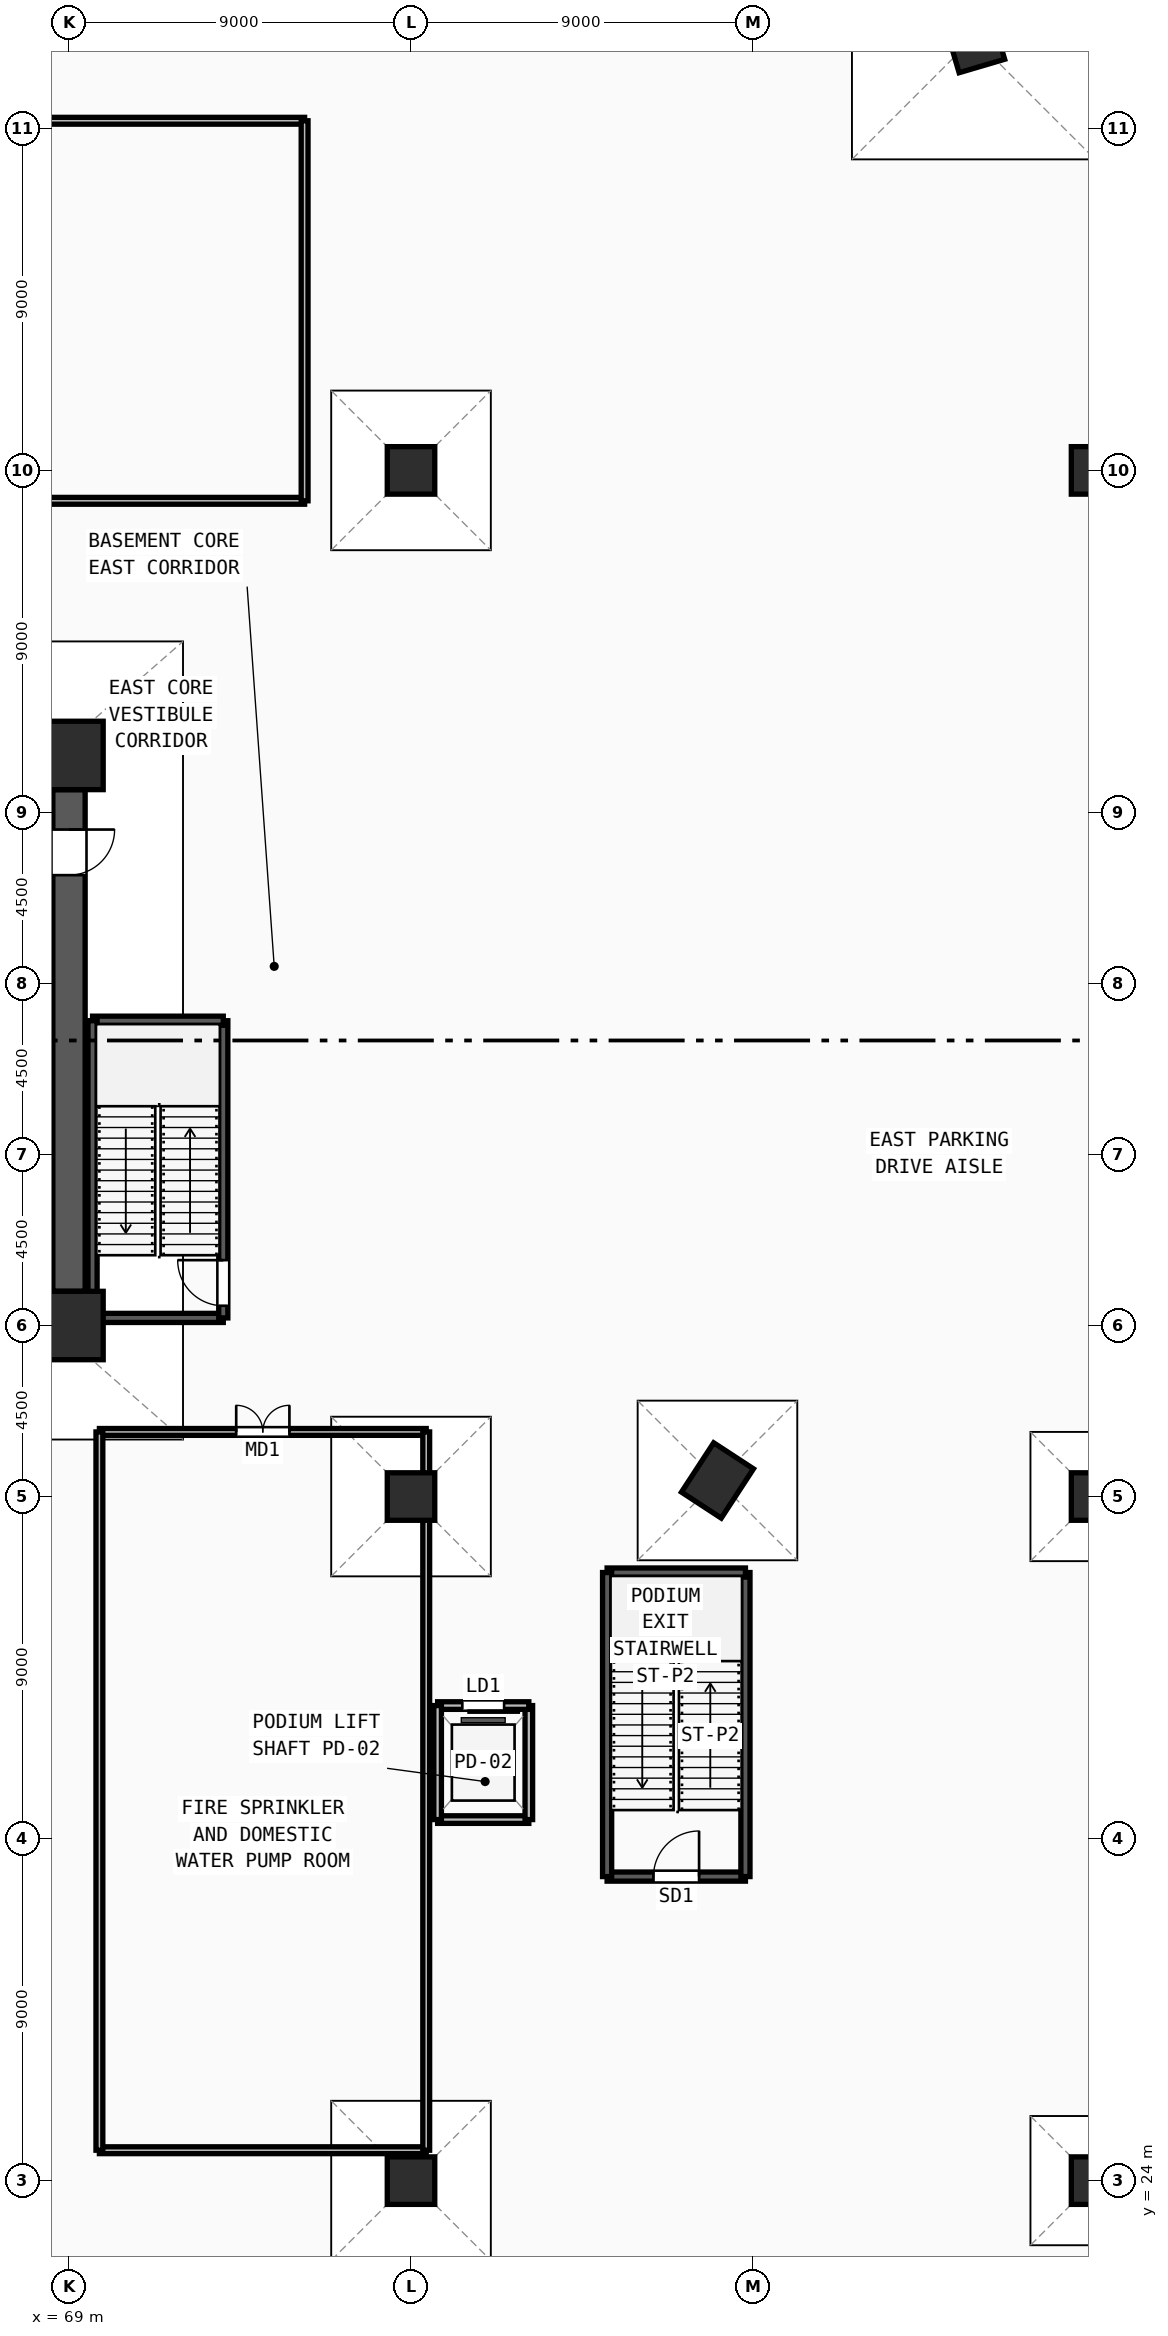
"""IFC4 building model, lengths in metres.
Left out: names, types, materials, properties, quantities, classifications, styles, units other than length and angle.
Written with IfcOpenShell. Run it as: python <this file> out.ifc"""

import sys

from ifc_helpers import new_model, si_unit, direction, frame, frame_2d, origin, origin_2d, place, context, subcontext, project, spatial, rectangle, extrude, source, transform, mapped, element, fill, save


model = new_model("IFC4")
c1 = context("Model", 3, precision=1e-05, world=origin(), true_north=direction((0.0, 1.0)))
c2 = subcontext(c1, "Body", "Model", "MODEL_VIEW")
j1 = project(units=[si_unit("LENGTHUNIT", "METRE"), si_unit("PLANEANGLEUNIT", "RADIAN")], contexts=[c1])
p1 = place(None, origin())
s1 = spatial("IfcSite", under=j1, at=p1, CompositionType="ELEMENT")
p2 = place(p1, origin())
s2 = spatial("IfcBuilding", under=s1, at=p2, CompositionType="ELEMENT")
p3 = place(p2, frame((0.0, 0.0, -9.6)))
s3 = spatial("IfcBuildingStorey", under=s2, at=p3, CompositionType="ELEMENT", Elevation=-9.6)
m1 = source(origin(), c2, "Body", "SweptSolid", [
    extrude(rectangle(XDim=1.8, YDim=1.8, at=origin_2d()), origin(), (0.0, 0.0, 1.0), 4.8),
])
for number, where, z_axis, x_axis in (
    (1, (69.0, 46.5, 0.0), (0.0, 0.0, 1.0), (1.0, 0.0, 0.0)),
    (2, (69.0, 61.5, 0.0), (0.0, 0.0, 1.0), (1.0, 0.0, 0.0)),
):
    element("IfcColumn", number, at=place(p3, frame(where, z_axis=z_axis, x_axis=x_axis)), inside=s3, PredefinedType="COLUMN", context=c2, shape_type="MappedRepresentation", body=[
        mapped(m1, transform((0.0, 0.0, 0.0), x_axis=(1.0, 0.0, 0.0), y_axis=(0.0, 1.0, 0.0), z_axis=(0.0, 0.0, 1.0), scale=1.0)),
    ])
m2 = source(origin(), c2, "Body", "SweptSolid", [
    extrude(rectangle(XDim=1.55, YDim=1.25, at=origin_2d()), origin(), (0.0, 0.0, 1.0), 4.8),
])
for number, where, z_axis, x_axis in (
    (3, (92.803, 80.384, 0.0), (0.0, 0.0, 1.0), (-0.283, 0.959, 0.0)),
    (4, (86.064, 42.423, 0.0), (0.0, 0.0, 1.0), (0.547, 0.837, 0.0)),
):
    element("IfcColumn", number, at=place(p3, frame(where, z_axis=z_axis, x_axis=x_axis)), inside=s3, PredefinedType="COLUMN", context=c2, shape_type="MappedRepresentation", body=[
        mapped(m2, transform((0.0, 0.0, 0.0), x_axis=(1.0, 0.0, 0.0), y_axis=(0.0, 1.0, 0.0), z_axis=(0.0, 0.0, 1.0), scale=1.0)),
    ])
m3 = source(origin(), c2, "Body", "SweptSolid", [
    extrude(rectangle(XDim=1.25, YDim=1.25, at=origin_2d()), origin(), (0.0, 0.0, 1.0), 4.8),
])
for number, where, z_axis, x_axis in (
    (5, (78.0, 24.0, 0.0), (0.0, 0.0, 1.0), (1.0, 0.0, 0.0)),
    (6, (96.0, 24.0, 0.0), (0.0, 0.0, 1.0), (1.0, 0.0, 0.0)),
    (7, (78.0, 42.0, 0.0), (0.0, 0.0, 1.0), (1.0, 0.0, 0.0)),
    (8, (96.0, 42.0, 0.0), (0.0, 0.0, 1.0), (1.0, 0.0, 0.0)),
    (9, (78.0, 69.0, 0.0), (0.0, 0.0, 1.0), (1.0, 0.0, 0.0)),
    (10, (96.0, 69.0, 0.0), (0.0, 0.0, 1.0), (1.0, 0.0, 0.0)),
):
    element("IfcColumn", number, at=place(p3, frame(where, z_axis=z_axis, x_axis=x_axis)), inside=s3, PredefinedType="COLUMN", context=c2, shape_type="MappedRepresentation", body=[
        mapped(m3, transform((0.0, 0.0, 0.0), x_axis=(1.0, 0.0, 0.0), y_axis=(0.0, 1.0, 0.0), z_axis=(0.0, 0.0, 1.0), scale=1.0)),
    ])
p4 = place(p3, frame((69.0, 60.6, 0.0), z_axis=(0.0, 0.0, 1.0), x_axis=(0.0, -1.0, 0.0)))
e11 = element("IfcWall", 11, at=p4, inside=s3, PredefinedType="SHEAR", context=c2, shape_type="SweptSolid", body=[
    extrude(rectangle(XDim=13.2, YDim=0.85, at=frame_2d((6.6, 0.0))), origin(), (0.0, 0.0, 1.0), 4.5),
])
m4 = source(origin(), c2, "Body", "SweptSolid", [
    extrude(rectangle(XDim=1.2, YDim=2.2, at=frame_2d((0.6, 1.1))), frame((0.0, 0.435, 0.0), z_axis=(0.0, -1.0, 0.0), x_axis=(1.0, 0.0, 0.0)), (0.0, 0.0, 1.0), 0.87),
])
p5 = place(p4, frame((1.05, 0.0, 0.0)))
e12 = element("IfcOpeningElement", 12, at=p5, cuts=e11, PredefinedType="OPENING", context=c2, shape_type="MappedRepresentation", body=[
    mapped(m4, transform((0.0, 0.0, 0.0), x_axis=(1.0, 0.0, 0.0), y_axis=(0.0, 1.0, 0.0), z_axis=(0.0, 0.0, 1.0), scale=1.0)),
])
p6 = place(p3, frame((69.62, 46.7, 0.0), z_axis=(0.0, 0.0, 1.0), x_axis=(1.0, 0.0, 0.0)))
e13 = element("IfcWall", 13, at=p6, inside=s3, PredefinedType="SOLIDWALL", context=c2, shape_type="SweptSolid", body=[
    extrude(rectangle(XDim=3.44, YDim=0.24, at=frame_2d((1.72, 0.0))), origin(), (0.0, 0.0, 1.0), 4.5),
])
p7 = place(p3, frame((73.06, 46.7, 0.0), z_axis=(0.0, 0.0, 1.0), x_axis=(0.0, 1.0, 0.0)))
e14 = element("IfcWall", 14, at=p7, inside=s3, PredefinedType="SOLIDWALL", context=c2, shape_type="SweptSolid", body=[
    extrude(rectangle(XDim=7.82, YDim=0.24, at=frame_2d((3.91, 0.0))), origin(), (0.0, 0.0, 1.0), 4.5),
])
m5 = source(origin(), c2, "Body", "SweptSolid", [
    extrude(rectangle(XDim=1.2, YDim=2.2, at=frame_2d((0.6, 1.1))), frame((0.0, 0.13, 0.0), z_axis=(0.0, -1.0, 0.0), x_axis=(1.0, 0.0, 0.0)), (0.0, 0.0, 1.0), 0.26),
])
p8 = place(p7, frame((0.32, 0.0, 0.0)))
e15 = element("IfcOpeningElement", 15, at=p8, cuts=e14, PredefinedType="OPENING", context=c2, shape_type="MappedRepresentation", body=[
    mapped(m5, transform((0.0, 0.0, 0.0), x_axis=(1.0, 0.0, 0.0), y_axis=(0.0, 1.0, 0.0), z_axis=(0.0, 0.0, 1.0), scale=1.0)),
])
p9 = place(p3, frame((73.06, 54.52, 0.0), z_axis=(0.0, 0.0, 1.0), x_axis=(-1.0, 0.0, 0.0)))
e16 = element("IfcWall", 16, at=p9, inside=s3, PredefinedType="SOLIDWALL", context=c2, shape_type="SweptSolid", body=[
    extrude(rectangle(XDim=3.44, YDim=0.24, at=frame_2d((1.72, 0.0))), origin(), (0.0, 0.0, 1.0), 4.5),
])
p10 = place(p3, frame((69.62, 54.52, 0.0), z_axis=(0.0, 0.0, 1.0), x_axis=(0.0, -1.0, 0.0)))
e17 = element("IfcWall", 17, at=p10, inside=s3, PredefinedType="SOLIDWALL", context=c2, shape_type="SweptSolid", body=[
    extrude(rectangle(XDim=7.82, YDim=0.24, at=frame_2d((3.91, 0.0))), origin(), (0.0, 0.0, 1.0), 4.5),
])
p11 = place(p3, frame((83.16, 32.0, 0.0), z_axis=(0.0, 0.0, 1.0), x_axis=(1.0, 0.0, 0.0)))
e18 = element("IfcWall", 18, at=p11, inside=s3, PredefinedType="SOLIDWALL", context=c2, shape_type="SweptSolid", body=[
    extrude(rectangle(XDim=3.64, YDim=0.24, at=frame_2d((1.82, 0.0))), origin(), (0.0, 0.0, 1.0), 4.5),
])
p12 = place(p11, frame((1.22, 0.0, 0.0)))
e19 = element("IfcOpeningElement", 19, at=p12, cuts=e18, PredefinedType="OPENING", context=c2, shape_type="MappedRepresentation", body=[
    mapped(m5, transform((0.0, 0.0, 0.0), x_axis=(1.0, 0.0, 0.0), y_axis=(0.0, 1.0, 0.0), z_axis=(0.0, 0.0, 1.0), scale=1.0)),
])
p13 = place(p3, frame((86.8, 32.0, 0.0), z_axis=(0.0, 0.0, 1.0), x_axis=(0.0, 1.0, 0.0)))
e20 = element("IfcWall", 20, at=p13, inside=s3, PredefinedType="SOLIDWALL", context=c2, shape_type="SweptSolid", body=[
    extrude(rectangle(XDim=8.0, YDim=0.24, at=frame_2d((4.0, 0.0))), origin(), (0.0, 0.0, 1.0), 4.5),
])
p14 = place(p3, frame((86.8, 40.0, 0.0), z_axis=(0.0, 0.0, 1.0), x_axis=(-1.0, 0.0, 0.0)))
e21 = element("IfcWall", 21, at=p14, inside=s3, PredefinedType="SOLIDWALL", context=c2, shape_type="SweptSolid", body=[
    extrude(rectangle(XDim=3.64, YDim=0.24, at=frame_2d((1.82, 0.0))), origin(), (0.0, 0.0, 1.0), 4.5),
])
p15 = place(p3, frame((83.16, 40.0, 0.0), z_axis=(0.0, 0.0, 1.0), x_axis=(0.0, -1.0, 0.0)))
e22 = element("IfcWall", 22, at=p15, inside=s3, PredefinedType="SOLIDWALL", context=c2, shape_type="SweptSolid", body=[
    extrude(rectangle(XDim=8.0, YDim=0.24, at=frame_2d((4.0, 0.0))), origin(), (0.0, 0.0, 1.0), 4.5),
])
p16 = place(p3, frame((78.7, 33.5, 0.0), z_axis=(0.0, 0.0, 1.0), x_axis=(1.0, 0.0, 0.0)))
e23 = element("IfcWall", 23, at=p16, inside=s3, PredefinedType="SOLIDWALL", context=c2, shape_type="SweptSolid", body=[
    extrude(rectangle(XDim=2.4, YDim=0.2, at=frame_2d((1.2, 0.0))), origin(), (0.0, 0.0, 1.0), 4.5),
])
p17 = place(p3, frame((81.1, 33.5, 0.0), z_axis=(0.0, 0.0, 1.0), x_axis=(0.0, 1.0, 0.0)))
e24 = element("IfcWall", 24, at=p17, inside=s3, PredefinedType="SOLIDWALL", context=c2, shape_type="SweptSolid", body=[
    extrude(rectangle(XDim=3.0, YDim=0.2, at=frame_2d((1.5, 0.0))), origin(), (0.0, 0.0, 1.0), 4.5),
])
p18 = place(p3, frame((81.1, 36.5, 0.0), z_axis=(0.0, 0.0, 1.0), x_axis=(-1.0, 0.0, 0.0)))
e25 = element("IfcWall", 25, at=p18, inside=s3, PredefinedType="SOLIDWALL", context=c2, shape_type="SweptSolid", body=[
    extrude(rectangle(XDim=2.4, YDim=0.2, at=frame_2d((1.2, 0.0))), origin(), (0.0, 0.0, 1.0), 4.5),
])
m6 = source(origin(), c2, "Body", "SweptSolid", [
    extrude(rectangle(XDim=1.1, YDim=2.2, at=frame_2d((0.55, 1.1))), frame((0.0, 0.11, 0.0), z_axis=(0.0, -1.0, 0.0), x_axis=(1.0, 0.0, 0.0)), (0.0, 0.0, 1.0), 0.22),
])
p19 = place(p18, frame((0.65, 0.0, 0.0)))
e26 = element("IfcOpeningElement", 26, at=p19, cuts=e25, PredefinedType="OPENING", context=c2, shape_type="MappedRepresentation", body=[
    mapped(m6, transform((0.0, 0.0, 0.0), x_axis=(1.0, 0.0, 0.0), y_axis=(0.0, 1.0, 0.0), z_axis=(0.0, 0.0, 1.0), scale=1.0)),
])
p20 = place(p3, frame((78.7, 36.5, 0.0), z_axis=(0.0, 0.0, 1.0), x_axis=(0.0, -1.0, 0.0)))
e27 = element("IfcWall", 27, at=p20, inside=s3, PredefinedType="SOLIDWALL", context=c2, shape_type="SweptSolid", body=[
    extrude(rectangle(XDim=3.0, YDim=0.2, at=frame_2d((1.5, 0.0))), origin(), (0.0, 0.0, 1.0), 4.5),
])
p21 = place(p3, frame((69.8, 43.7, 0.0), z_axis=(0.0, 0.0, 1.0), x_axis=(1.0, 0.0, 0.0)))
e28 = element("IfcWall", 28, at=p21, inside=s3, PredefinedType="PARTITIONING", context=c2, shape_type="SweptSolid", body=[
    extrude(rectangle(XDim=8.6, YDim=0.18, at=frame_2d((4.3, 0.0))), origin(), (0.0, 0.0, 1.0), 4.5),
])
m7 = source(origin(), c2, "Body", "SweptSolid", [
    extrude(rectangle(XDim=1.4, YDim=2.25, at=frame_2d((0.7, 1.125))), frame((0.0, 0.1, 0.0), z_axis=(0.0, -1.0, 0.0), x_axis=(1.0, 0.0, 0.0)), (0.0, 0.0, 1.0), 0.2),
])
p22 = place(p21, frame((3.6, 0.0, 0.0)))
e29 = element("IfcOpeningElement", 29, at=p22, cuts=e28, PredefinedType="OPENING", context=c2, shape_type="MappedRepresentation", body=[
    mapped(m7, transform((0.0, 0.0, 0.0), x_axis=(1.0, 0.0, 0.0), y_axis=(0.0, 1.0, 0.0), z_axis=(0.0, 0.0, 1.0), scale=1.0)),
])
p23 = place(p3, frame((60.2, 68.2, 0.0), z_axis=(0.0, 0.0, 1.0), x_axis=(1.0, 0.0, 0.0)))
e30 = element("IfcWall", 30, at=p23, inside=s3, PredefinedType="PARTITIONING", context=c2, shape_type="SweptSolid", body=[
    extrude(rectangle(XDim=15.0, YDim=0.18, at=frame_2d((7.5, 0.0))), origin(), (0.0, 0.0, 1.0), 4.5),
])
p24 = place(p23, frame((6.8, 0.0, 0.0)))
e31 = element("IfcOpeningElement", 31, at=p24, cuts=e30, PredefinedType="OPENING", context=c2, shape_type="MappedRepresentation", body=[
    mapped(m7, transform((0.0, 0.0, 0.0), x_axis=(1.0, 0.0, 0.0), y_axis=(0.0, 1.0, 0.0), z_axis=(0.0, 0.0, 1.0), scale=1.0)),
])
p25 = place(p3, frame((69.8, 24.8, 0.0), z_axis=(0.0, 0.0, 1.0), x_axis=(1.0, 0.0, 0.0)))
e32 = element("IfcWall", 32, at=p25, inside=s3, PredefinedType="PARTITIONING", context=c2, shape_type="SweptSolid", body=[
    extrude(rectangle(XDim=8.6, YDim=0.18, at=frame_2d((4.3, 0.0))), origin(), (0.0, 0.0, 1.0), 4.5),
])
for number, where, z_axis, x_axis in (
    (33, (69.8, 24.8, 0.0), (0.0, 0.0, 1.0), (0.0, 1.0, 0.0)),
    (34, (78.4, 24.8, 0.0), (0.0, 0.0, 1.0), (0.0, 1.0, 0.0)),
):
    element("IfcWall", number, at=place(p3, frame(where, z_axis=z_axis, x_axis=x_axis)), inside=s3, PredefinedType="PARTITIONING", context=c2, shape_type="SweptSolid", body=[
        extrude(rectangle(XDim=18.9, YDim=0.18, at=frame_2d((9.45, 0.0))), origin(), (0.0, 0.0, 1.0), 4.5),
    ])
p26 = place(p3, frame((60.2, 78.2, 0.0), z_axis=(0.0, 0.0, 1.0), x_axis=(1.0, 0.0, 0.0)))
e35 = element("IfcWall", 35, at=p26, inside=s3, PredefinedType="PARTITIONING", context=c2, shape_type="SweptSolid", body=[
    extrude(rectangle(XDim=15.0, YDim=0.18, at=frame_2d((7.5, 0.0))), origin(), (0.0, 0.0, 1.0), 4.5),
])
p27 = place(p3, frame((75.2, 68.2, 0.0), z_axis=(0.0, 0.0, 1.0), x_axis=(0.0, 1.0, 0.0)))
e36 = element("IfcWall", 36, at=p27, inside=s3, PredefinedType="PARTITIONING", context=c2, shape_type="SweptSolid", body=[
    extrude(rectangle(XDim=10.0, YDim=0.18, at=frame_2d((5.0, 0.0))), origin(), (0.0, 0.0, 1.0), 4.5),
])
m8 = source(origin(), c2, "Body", "SweptSolid", [
    extrude(rectangle(XDim=1.2, YDim=2.2, at=frame_2d((0.6, 1.1))), frame((0.0, 0.025, 0.0), z_axis=(0.0, -1.0, 0.0), x_axis=(1.0, 0.0, 0.0)), (0.0, 0.0, 1.0), 0.05),
])
p28 = place(p5, origin())
e37 = element("IfcDoor", 37, at=p28, inside=s3, OperationType="SINGLE_SWING_LEFT", PredefinedType="DOOR", context=c2, shape_type="MappedRepresentation", body=[
    mapped(m8, transform((0.0, 0.0, 0.0), x_axis=(1.0, 0.0, 0.0), y_axis=(0.0, 1.0, 0.0), z_axis=(0.0, 0.0, 1.0), scale=1.0)),
])
fill(e12, e37)
p29 = place(p8, origin())
e38 = element("IfcDoor", 38, at=p29, inside=s3, OperationType="SINGLE_SWING_RIGHT", PredefinedType="DOOR", context=c2, shape_type="MappedRepresentation", body=[
    mapped(m8, transform((0.0, 0.0, 0.0), x_axis=(1.0, 0.0, 0.0), y_axis=(0.0, 1.0, 0.0), z_axis=(0.0, 0.0, 1.0), scale=1.0)),
])
fill(e15, e38)
p30 = place(p12, origin())
e39 = element("IfcDoor", 39, at=p30, inside=s3, OperationType="SINGLE_SWING_RIGHT", PredefinedType="DOOR", context=c2, shape_type="MappedRepresentation", body=[
    mapped(m8, transform((0.0, 0.0, 0.0), x_axis=(1.0, 0.0, 0.0), y_axis=(0.0, 1.0, 0.0), z_axis=(0.0, 0.0, 1.0), scale=1.0)),
])
fill(e19, e39)
m9 = source(origin(), c2, "Body", "SweptSolid", [
    extrude(rectangle(XDim=1.1, YDim=2.2, at=frame_2d((0.55, 1.1))), frame((0.0, 0.025, 0.0), z_axis=(0.0, -1.0, 0.0), x_axis=(1.0, 0.0, 0.0)), (0.0, 0.0, 1.0), 0.05),
])
p31 = place(p19, origin())
e40 = element("IfcDoor", 40, at=p31, inside=s3, OperationType="SLIDING_TO_LEFT", PredefinedType="DOOR", context=c2, shape_type="MappedRepresentation", body=[
    mapped(m9, transform((0.0, 0.0, 0.0), x_axis=(1.0, 0.0, 0.0), y_axis=(0.0, 1.0, 0.0), z_axis=(0.0, 0.0, 1.0), scale=1.0)),
])
fill(e26, e40)
m10 = source(origin(), c2, "Body", "SweptSolid", [
    extrude(rectangle(XDim=1.4, YDim=2.25, at=frame_2d((0.7, 1.125))), frame((0.0, 0.025, 0.0), z_axis=(0.0, -1.0, 0.0), x_axis=(1.0, 0.0, 0.0)), (0.0, 0.0, 1.0), 0.05),
])
p32 = place(p22, origin())
e41 = element("IfcDoor", 41, at=p32, inside=s3, OperationType="DOUBLE_DOOR_SINGLE_SWING", PredefinedType="DOOR", context=c2, shape_type="MappedRepresentation", body=[
    mapped(m10, transform((0.0, 0.0, 0.0), x_axis=(1.0, 0.0, 0.0), y_axis=(0.0, 1.0, 0.0), z_axis=(0.0, 0.0, 1.0), scale=1.0)),
])
fill(e29, e41)
save(model, sys.argv[1])
